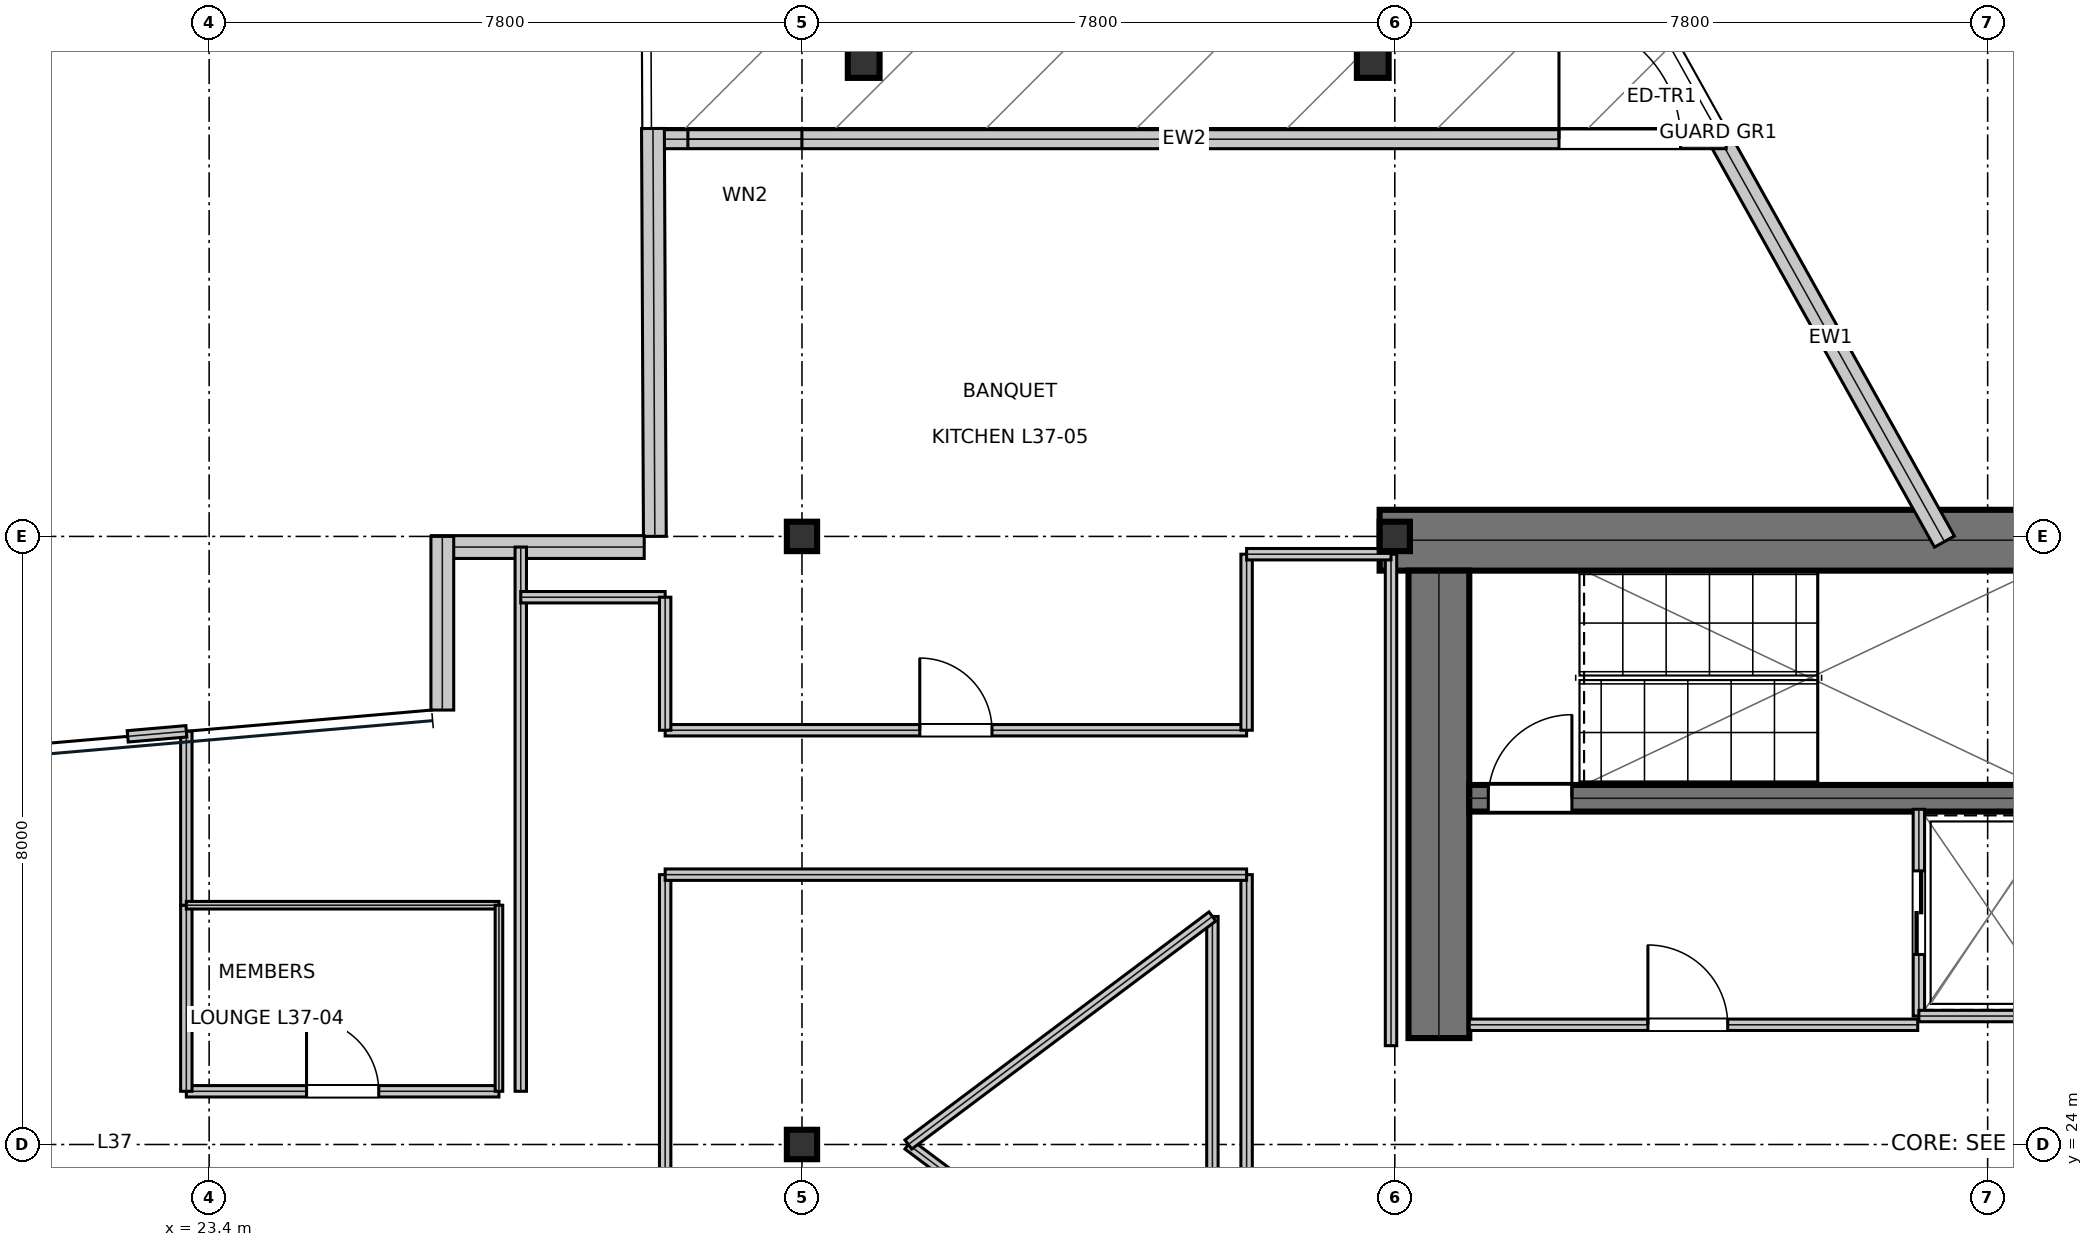
"""IFC4 building model, lengths in metres.
Left out: names, types, materials, properties, quantities, classifications, styles, units other than length and angle.
Written with IfcOpenShell. Run it as: python <this file> out.ifc"""

import sys

from ifc_helpers import new_model, si_unit, direction, frame, frame_2d, origin, origin_2d, place, context, subcontext, project, spatial, rectangle, i_section, extrude, element, fill, save


model = new_model("IFC4")
c1 = context("Model", 3, precision=1e-05, world=origin(), true_north=direction((0.0, 1.0)))
c2 = subcontext(c1, "Body", "Model", "MODEL_VIEW")
j1 = project(units=[si_unit("LENGTHUNIT", "METRE"), si_unit("PLANEANGLEUNIT", "RADIAN")], contexts=[c1])
p1 = place(None, origin())
s1 = spatial("IfcSite", under=j1, at=p1, CompositionType="ELEMENT")
p2 = place(p1, origin())
s2 = spatial("IfcBuilding", under=s1, at=p2, CompositionType="ELEMENT")
p3 = place(p2, frame((0.0, 0.0, 161.4)))
s3 = spatial("IfcBuildingStorey", under=s2, at=p3, CompositionType="ELEMENT", Elevation=161.4)
p4 = place(p3, frame((38.8, 31.95, 0.0), z_axis=(0.0, 0.0, 1.0), x_axis=(1.0, 0.0, 0.0)))
e1 = element("IfcWall", 1, at=p4, inside=s3, PredefinedType="SHEAR", context=c2, shape_type="SweptSolid", body=[
    extrude(rectangle(XDim=16.0, YDim=0.8, at=frame_2d((8.0, 0.0))), origin(), (0.0, 0.0, 1.0), 3.81),
])
p5 = place(p3, frame((39.58, 25.4, 0.0), z_axis=(0.0, 0.0, 1.0), x_axis=(0.0, 1.0, 0.0)))
e2 = element("IfcWall", 2, at=p5, inside=s3, PredefinedType="SHEAR", context=c2, shape_type="SweptSolid", body=[
    extrude(rectangle(XDim=6.15, YDim=0.8, at=frame_2d((3.075, 0.0))), origin(), (0.0, 0.0, 1.0), 3.81),
])
p6 = place(p3, frame((39.98, 28.555, 0.0), z_axis=(0.0, 0.0, 1.0), x_axis=(1.0, 0.0, 0.0)))
e3 = element("IfcWall", 3, at=p6, inside=s3, PredefinedType="SHEAR", context=c2, shape_type="SweptSolid", body=[
    extrude(rectangle(XDim=7.71, YDim=0.35, at=frame_2d((3.855, 0.0))), origin(), (0.0, 0.0, 1.0), 3.81),
])
p7 = place(p6, frame((0.25, 0.0, 0.0)))
e4 = element("IfcOpeningElement", 4, at=p7, cuts=e3, PredefinedType="OPENING", context=c2, shape_type="SweptSolid", body=[
    extrude(rectangle(XDim=1.1, YDim=2.15, at=frame_2d((0.55, 1.075))), frame((0.0, 0.185, 0.0), z_axis=(0.0, -1.0, 0.0), x_axis=(1.0, 0.0, 0.0)), (0.0, 0.0, 1.0), 0.37),
])
for number, where, z_axis, x_axis in (
    (5, (31.2, 24.0, 0.0), (0.0, 0.0, 1.0), (1.0, 0.0, 0.0)),
    (6, (31.2, 32.0, 0.0), (0.0, 0.0, 1.0), (1.0, 0.0, 0.0)),
    (7, (39.0, 32.0, 0.0), (0.0, 0.0, 1.0), (1.0, 0.0, 0.0)),
):
    element("IfcColumn", number, at=place(p3, frame(where, z_axis=z_axis, x_axis=x_axis)), inside=s3, PredefinedType="COLUMN", context=c2, shape_type="SweptSolid", body=[
        extrude(i_section(OverallWidth=0.398, OverallDepth=0.387, WebThickness=0.021, FlangeThickness=0.033, at=origin_2d()), origin(), (0.0, 0.0, 1.0), 4.044),
    ])
p8 = place(p3, frame((32.012, 38.26, 0.016), z_axis=(0.003463243796, -0.00747331556, 0.999966077173), x_axis=(0.907310606534, 0.420461012784, 0.0)))
e8 = element("IfcColumn", 8, at=p8, inside=s3, PredefinedType="COLUMN", context=c2, shape_type="SweptSolid", body=[
    extrude(i_section(OverallWidth=0.418, OverallDepth=0.455, WebThickness=0.042, FlangeThickness=0.068, at=origin_2d()), origin(), (0.0, 0.0, 1.0), 4.018),
])
p9 = place(p3, frame((38.71, 38.26, 0.016), z_axis=(-0.001215179652, -0.007473354861, 0.999971335742), x_axis=(0.987036848987, -0.160493796583, 0.0)))
e9 = element("IfcColumn", 9, at=p9, inside=s3, PredefinedType="COLUMN", context=c2, shape_type="SweptSolid", body=[
    extrude(i_section(OverallWidth=0.418, OverallDepth=0.455, WebThickness=0.042, FlangeThickness=0.068, at=origin_2d()), origin(), (0.0, 0.0, 1.0), 4.018),
])
p10 = place(p3, frame((46.231, 31.932, 0.0), z_axis=(0.0, 0.0, 1.0), x_axis=(-0.487234407079, 0.873271225083, 0.0)))
e10 = element("IfcWall", 10, at=p10, inside=s3, PredefinedType="STANDARD", context=c2, shape_type="SweptSolid", body=[
    extrude(rectangle(XDim=6.145, YDim=0.3, at=frame_2d((3.072, 0.0))), origin(), (0.0, 0.0, 1.0), 3.338),
])
p11 = place(p3, frame((43.36, 37.226, 0.0), z_axis=(0.0, 0.0, 1.0), x_axis=(-1.0, 0.0, 0.0)))
e11 = element("IfcWall", 11, at=p11, inside=s3, PredefinedType="STANDARD", context=c2, shape_type="SweptSolid", body=[
    extrude(rectangle(XDim=14.26, YDim=0.25, at=frame_2d((7.13, 0.0))), origin(), (0.0, 0.0, 1.0), 3.19),
])
p12 = place(p11, frame((0.6, 0.0, 0.0)))
e12 = element("IfcOpeningElement", 12, at=p12, cuts=e11, PredefinedType="OPENING", context=c2, shape_type="SweptSolid", body=[
    extrude(rectangle(XDim=1.6, YDim=2.2, at=frame_2d((0.8, 1.1))), frame((0.0, 0.135, 0.0), z_axis=(0.0, -1.0, 0.0), x_axis=(1.0, 0.0, 0.0)), (0.0, 0.0, 1.0), 0.27),
])
p13 = place(p11, frame((12.161, 0.0, 0.95)))
e13 = element("IfcOpeningElement", 13, at=p13, cuts=e11, PredefinedType="OPENING", context=c2, shape_type="SweptSolid", body=[
    extrude(rectangle(XDim=1.5, YDim=1.6, at=frame_2d((0.75, 0.8))), frame((0.0, 0.135, 0.0), z_axis=(0.0, -1.0, 0.0), x_axis=(1.0, 0.0, 0.0)), (0.0, 0.0, 1.0), 0.27),
])
p14 = place(p3, frame((29.239, 37.367, 0.0), z_axis=(0.0, 0.0, 1.0), x_axis=(0.004686240002, -0.999989019517, 0.0)))
e14 = element("IfcWall", 14, at=p14, inside=s3, PredefinedType="STANDARD", context=c2, shape_type="SweptSolid", body=[
    extrude(rectangle(XDim=5.366, YDim=0.3, at=frame_2d((2.683, 0.0))), origin(), (0.0, 0.0, 1.0), 3.81),
])
p15 = place(p3, frame((29.124, 31.86, 0.0), z_axis=(0.0, 0.0, 1.0), x_axis=(-1.0, 0.0, 0.0)))
e15 = element("IfcWall", 15, at=p15, inside=s3, PredefinedType="STANDARD", context=c2, shape_type="SweptSolid", body=[
    extrude(rectangle(XDim=2.796, YDim=0.3, at=frame_2d((1.398, 0.0))), origin(), (0.0, 0.0, 1.0), 3.81),
])
p16 = place(p3, frame((26.468, 32.0, 0.0), z_axis=(0.0, 0.0, 1.0), x_axis=(0.0, -1.0, 0.0)))
e16 = element("IfcWall", 16, at=p16, inside=s3, PredefinedType="STANDARD", context=c2, shape_type="SweptSolid", body=[
    extrude(rectangle(XDim=2.284, YDim=0.3, at=frame_2d((1.142, 0.0))), origin(), (0.0, 0.0, 1.0), 3.338),
])
p17 = place(p3, frame((39.98, 25.575, 0.0), z_axis=(0.0, 0.0, 1.0), x_axis=(1.0, 0.0, 0.0)))
e17 = element("IfcWall", 17, at=p17, inside=s3, PredefinedType="PARTITIONING", context=c2, shape_type="SweptSolid", body=[
    extrude(rectangle(XDim=5.9, YDim=0.15, at=frame_2d((2.95, 0.0))), origin(), (0.0, 0.0, 1.0), 3.81),
])
p18 = place(p17, frame((2.35, 0.0, 0.0)))
e18 = element("IfcOpeningElement", 18, at=p18, cuts=e17, PredefinedType="OPENING", context=c2, shape_type="SweptSolid", body=[
    extrude(rectangle(XDim=1.05, YDim=2.15, at=frame_2d((0.525, 1.075))), frame((0.0, 0.085, 0.0), z_axis=(0.0, -1.0, 0.0), x_axis=(1.0, 0.0, 0.0)), (0.0, 0.0, 1.0), 0.17),
])
p19 = place(p3, frame((45.895, 25.69, 0.0), z_axis=(0.0, 0.0, 1.0), x_axis=(0.0, 1.0, 0.0)))
e19 = element("IfcWall", 19, at=p19, inside=s3, PredefinedType="PARTITIONING", context=c2, shape_type="SweptSolid", body=[
    extrude(rectangle(XDim=2.72, YDim=0.15, at=frame_2d((1.36, 0.0))), origin(), (0.0, 0.0, 1.0), 3.81),
])
p20 = place(p19, frame((0.81, 0.0, 0.0)))
e20 = element("IfcOpeningElement", 20, at=p20, cuts=e19, PredefinedType="OPENING", context=c2, shape_type="SweptSolid", body=[
    extrude(rectangle(XDim=1.1, YDim=2.15, at=frame_2d((0.55, 1.075))), frame((0.0, 0.085, 0.0), z_axis=(0.0, -1.0, 0.0), x_axis=(1.0, 0.0, 0.0)), (0.0, 0.0, 1.0), 0.17),
])
p21 = place(p3, frame((45.895, 25.69, 0.0), z_axis=(0.0, 0.0, 1.0), x_axis=(1.0, 0.0, 0.0)))
e21 = element("IfcWall", 21, at=p21, inside=s3, PredefinedType="PARTITIONING", context=c2, shape_type="SweptSolid", body=[
    extrude(rectangle(XDim=1.915, YDim=0.15, at=frame_2d((0.958, 0.0))), origin(), (0.0, 0.0, 1.0), 3.81),
])
p22 = place(p3, frame((37.05, 14.5, 0.0), z_axis=(0.0, 0.0, 1.0), x_axis=(0.0, 1.0, 0.0)))
e22 = element("IfcWall", 22, at=p22, inside=s3, PredefinedType="PARTITIONING", context=c2, shape_type="SweptSolid", body=[
    extrude(rectangle(XDim=13.05, YDim=0.15, at=frame_2d((6.525, 0.0))), origin(), (0.0, 0.0, 1.0), 3.19),
])
p23 = place(p22, frame((4.61, 0.0, 0.0)))
e23 = element("IfcOpeningElement", 23, at=p23, cuts=e22, PredefinedType="OPENING", context=c2, shape_type="SweptSolid", body=[
    extrude(rectangle(XDim=0.95, YDim=2.15, at=frame_2d((0.475, 1.075))), frame((0.0, 0.085, 0.0), z_axis=(0.0, -1.0, 0.0), x_axis=(1.0, 0.0, 0.0)), (0.0, 0.0, 1.0), 0.17),
])
p24 = place(p3, frame((23.1, 24.7, 0.0), z_axis=(0.0, 0.0, 1.0), x_axis=(1.0, 0.0, 0.0)))
e24 = element("IfcWall", 24, at=p24, inside=s3, PredefinedType="PARTITIONING", context=c2, shape_type="SweptSolid", body=[
    extrude(rectangle(XDim=4.113, YDim=0.15, at=frame_2d((2.056, 0.0))), origin(), (0.0, 0.0, 1.0), 3.19),
])
p25 = place(p24, frame((1.582, 0.0, 0.0)))
e25 = element("IfcOpeningElement", 25, at=p25, cuts=e24, PredefinedType="OPENING", context=c2, shape_type="SweptSolid", body=[
    extrude(rectangle(XDim=0.95, YDim=2.15, at=frame_2d((0.475, 1.075))), frame((0.0, 0.085, 0.0), z_axis=(0.0, -1.0, 0.0), x_axis=(1.0, 0.0, 0.0)), (0.0, 0.0, 1.0), 0.17),
])
p26 = place(p3, frame((29.4, 29.45, 0.0), z_axis=(0.0, 0.0, 1.0), x_axis=(1.0, 0.0, 0.0)))
e26 = element("IfcWall", 26, at=p26, inside=s3, PredefinedType="PARTITIONING", context=c2, shape_type="SweptSolid", body=[
    extrude(rectangle(XDim=7.65, YDim=0.15, at=frame_2d((3.825, 0.0))), origin(), (0.0, 0.0, 1.0), 3.19),
])
p27 = place(p26, frame((3.35, 0.0, 0.0)))
e27 = element("IfcOpeningElement", 27, at=p27, cuts=e26, PredefinedType="OPENING", context=c2, shape_type="SweptSolid", body=[
    extrude(rectangle(XDim=0.95, YDim=2.15, at=frame_2d((0.475, 1.075))), frame((0.0, 0.085, 0.0), z_axis=(0.0, -1.0, 0.0), x_axis=(1.0, 0.0, 0.0)), (0.0, 0.0, 1.0), 0.17),
])
p28 = place(p3, frame((29.4, 16.8, 0.0), z_axis=(0.0, 0.0, 1.0), x_axis=(0.0, 1.0, 0.0)))
e28 = element("IfcWall", 28, at=p28, inside=s3, PredefinedType="PARTITIONING", context=c2, shape_type="SweptSolid", body=[
    extrude(rectangle(XDim=10.75, YDim=0.15, at=frame_2d((5.375, 0.0))), origin(), (0.0, 0.0, 1.0), 3.19),
])
p29 = place(p3, frame((29.4, 27.55, 0.0), z_axis=(0.0, 0.0, 1.0), x_axis=(1.0, 0.0, 0.0)))
e29 = element("IfcWall", 29, at=p29, inside=s3, PredefinedType="PARTITIONING", context=c2, shape_type="SweptSolid", body=[
    extrude(rectangle(XDim=7.65, YDim=0.15, at=frame_2d((3.825, 0.0))), origin(), (0.0, 0.0, 1.0), 3.19),
])
p30 = place(p3, frame((23.1, 24.7, 0.0), z_axis=(0.0, 0.0, 1.0), x_axis=(0.0, 1.0, 0.0)))
e30 = element("IfcWall", 30, at=p30, inside=s3, PredefinedType="PARTITIONING", context=c2, shape_type="SweptSolid", body=[
    extrude(rectangle(XDim=2.448, YDim=0.15, at=frame_2d((1.224, 0.0))), origin(), (0.0, 0.0, 1.0), 3.19),
])
p31 = place(p3, frame((27.5, 24.7, 0.0), z_axis=(0.0, 0.0, 1.0), x_axis=(0.0, 1.0, 0.0)))
e31 = element("IfcWall", 31, at=p31, inside=s3, PredefinedType="PARTITIONING", context=c2, shape_type="SweptSolid", body=[
    extrude(rectangle(XDim=7.16, YDim=0.15, at=frame_2d((3.58, 0.0))), origin(), (0.0, 0.0, 1.0), 3.338),
])
p32 = place(p3, frame((38.95, 25.3, 0.0), z_axis=(0.0, 0.0, 1.0), x_axis=(0.0, 1.0, 0.0)))
e32 = element("IfcWall", 32, at=p32, inside=s3, PredefinedType="PARTITIONING", context=c2, shape_type="SweptSolid", body=[
    extrude(rectangle(XDim=6.466, YDim=0.15, at=frame_2d((3.233, 0.0))), origin(), (0.0, 0.0, 1.0), 3.443),
])
p33 = place(p3, frame((37.05, 29.45, 0.0), z_axis=(0.0, 0.0, 1.0), x_axis=(0.0, 1.0, 0.0)))
e33 = element("IfcWall", 33, at=p33, inside=s3, PredefinedType="PARTITIONING", context=c2, shape_type="SweptSolid", body=[
    extrude(rectangle(XDim=2.316, YDim=0.15, at=frame_2d((1.158, 0.0))), origin(), (0.0, 0.0, 1.0), 3.443),
])
p34 = place(p3, frame((23.1, 27.148, 0.0), z_axis=(0.0, 0.0, 1.0), x_axis=(0.0, 1.0, 0.0)))
e34 = element("IfcWall", 34, at=p34, inside=s3, PredefinedType="PARTITIONING", context=c2, shape_type="SweptSolid", body=[
    extrude(rectangle(XDim=2.288, YDim=0.15, at=frame_2d((1.144, 0.0))), origin(), (0.0, 0.0, 1.0), 3.81),
])
p35 = place(p3, frame((37.05, 31.766, 0.0), z_axis=(0.0, 0.0, 1.0), x_axis=(1.0, 0.0, 0.0)))
e35 = element("IfcWall", 35, at=p35, inside=s3, PredefinedType="PARTITIONING", context=c2, shape_type="SweptSolid", body=[
    extrude(rectangle(XDim=1.9, YDim=0.15, at=frame_2d((0.95, 0.0))), origin(), (0.0, 0.0, 1.0), 3.19),
])
p36 = place(p3, frame((27.5, 31.2, 0.0), z_axis=(0.0, 0.0, 1.0), x_axis=(1.0, 0.0, 0.0)))
e36 = element("IfcWall", 36, at=p36, inside=s3, PredefinedType="PARTITIONING", context=c2, shape_type="SweptSolid", body=[
    extrude(rectangle(XDim=1.9, YDim=0.15, at=frame_2d((0.95, 0.0))), origin(), (0.0, 0.0, 1.0), 3.338),
])
p37 = place(p3, frame((29.4, 29.45, 0.0), z_axis=(0.0, 0.0, 1.0), x_axis=(0.0, 1.0, 0.0)))
e37 = element("IfcWall", 37, at=p37, inside=s3, PredefinedType="PARTITIONING", context=c2, shape_type="SweptSolid", body=[
    extrude(rectangle(XDim=1.75, YDim=0.15, at=frame_2d((0.875, 0.0))), origin(), (0.0, 0.0, 1.0), 3.81),
])
p38 = place(p3, frame((22.328, 29.369, 0.0), z_axis=(0.0, 0.0, 1.0), x_axis=(0.996264203876, 0.086357605777, 0.0)))
e38 = element("IfcWall", 38, at=p38, inside=s3, PredefinedType="PARTITIONING", context=c2, shape_type="SweptSolid", body=[
    extrude(rectangle(XDim=0.775, YDim=0.15, at=frame_2d((0.387, 0.0))), origin(), (0.0, 0.0, 1.0), 3.81),
])
p39 = place(p3, frame((23.1, 27.148, 0.0), z_axis=(0.0, 0.0, 1.0), x_axis=(1.0, 0.0, 0.0)))
e39 = element("IfcWall", 39, at=p39, inside=s3, PredefinedType="PARTITIONING", context=c2, shape_type="SweptSolid", body=[
    extrude(rectangle(XDim=4.113, YDim=0.1, at=frame_2d((2.056, 0.0))), origin(), (0.0, 0.0, 1.0), 3.81),
])
p40 = place(p3, frame((27.213, 24.7, 0.0), z_axis=(0.0, 0.0, 1.0), x_axis=(0.0, 1.0, 0.0)))
e40 = element("IfcWall", 40, at=p40, inside=s3, PredefinedType="PARTITIONING", context=c2, shape_type="SweptSolid", body=[
    extrude(rectangle(XDim=2.448, YDim=0.1, at=frame_2d((1.224, 0.0))), origin(), (0.0, 0.0, 1.0), 3.81),
])
p41 = place(p3, frame((32.6, 24.0, 0.0), z_axis=(0.0, 0.0, 1.0), x_axis=(0.8, -0.6, 0.0)))
e41 = element("IfcWall", 41, at=p41, inside=s3, PredefinedType="MOVABLE", context=c2, shape_type="SweptSolid", body=[
    extrude(rectangle(XDim=5.0, YDim=0.15, at=frame_2d((2.5, 0.0))), origin(), (0.0, 0.0, 1.0), 3.81),
])
p42 = place(p3, frame((36.6, 21.0, 0.0), z_axis=(0.0, 0.0, 1.0), x_axis=(0.0, 1.0, 0.0)))
e42 = element("IfcWall", 42, at=p42, inside=s3, PredefinedType="MOVABLE", context=c2, shape_type="SweptSolid", body=[
    extrude(rectangle(XDim=6.0, YDim=0.15, at=frame_2d((3.0, 0.0))), origin(), (0.0, 0.0, 1.0), 3.81),
])
p43 = place(p3, frame((36.6, 27.0, 0.0), z_axis=(0.0, 0.0, 1.0), x_axis=(-0.8, -0.6, 0.0)))
e43 = element("IfcWall", 43, at=p43, inside=s3, PredefinedType="MOVABLE", context=c2, shape_type="SweptSolid", body=[
    extrude(rectangle(XDim=5.0, YDim=0.15, at=frame_2d((2.5, 0.0))), origin(), (0.0, 0.0, 1.0), 3.81),
])
p44 = place(p12, frame((1.6, 0.0, 0.0), z_axis=(0.0, 0.0, 1.0), x_axis=(-1.0, 0.0, 0.0)))
e44 = element("IfcDoor", 44, at=p44, inside=s3, OperationType="SINGLE_SWING_LEFT", PredefinedType="DOOR", context=c2, shape_type="SweptSolid", body=[
    extrude(rectangle(XDim=1.6, YDim=2.2, at=frame_2d((0.8, 1.1))), frame((0.0, 0.025, 0.0), z_axis=(0.0, -1.0, 0.0), x_axis=(1.0, 0.0, 0.0)), (0.0, 0.0, 1.0), 0.05),
])
fill(e12, e44)
p45 = place(p13, origin())
e45 = element("IfcWindow", 45, at=p45, inside=s3, PartitioningType="SINGLE_PANEL", PredefinedType="WINDOW", context=c2, shape_type="SweptSolid", body=[
    extrude(rectangle(XDim=1.5, YDim=1.6, at=frame_2d((0.75, 0.8))), frame((0.0, 0.03, 0.0), z_axis=(0.0, -1.0, 0.0), x_axis=(1.0, 0.0, 0.0)), (0.0, 0.0, 1.0), 0.06),
])
fill(e13, e45)
p46 = place(p18, origin())
e46 = element("IfcDoor", 46, at=p46, inside=s3, OperationType="SINGLE_SWING_LEFT", PredefinedType="DOOR", context=c2, shape_type="SweptSolid", body=[
    extrude(rectangle(XDim=1.05, YDim=2.15, at=frame_2d((0.525, 1.075))), frame((0.0, 0.025, 0.0), z_axis=(0.0, -1.0, 0.0), x_axis=(1.0, 0.0, 0.0)), (0.0, 0.0, 1.0), 0.05),
])
fill(e18, e46)
p47 = place(p20, frame((1.1, 0.0, 0.0), z_axis=(0.0, 0.0, 1.0), x_axis=(-1.0, 0.0, 0.0)))
e47 = element("IfcDoor", 47, at=p47, inside=s3, OperationType="DOUBLE_DOOR_SLIDING", PredefinedType="DOOR", context=c2, shape_type="SweptSolid", body=[
    extrude(rectangle(XDim=1.1, YDim=2.15, at=frame_2d((0.55, 1.075))), frame((0.0, 0.025, 0.0), z_axis=(0.0, -1.0, 0.0), x_axis=(1.0, 0.0, 0.0)), (0.0, 0.0, 1.0), 0.05),
])
fill(e20, e47)
p48 = place(p25, origin())
e48 = element("IfcDoor", 48, at=p48, inside=s3, OperationType="SINGLE_SWING_LEFT", PredefinedType="DOOR", context=c2, shape_type="SweptSolid", body=[
    extrude(rectangle(XDim=0.95, YDim=2.15, at=frame_2d((0.475, 1.075))), frame((0.0, 0.025, 0.0), z_axis=(0.0, -1.0, 0.0), x_axis=(1.0, 0.0, 0.0)), (0.0, 0.0, 1.0), 0.05),
])
fill(e25, e48)
p49 = place(p27, origin())
e49 = element("IfcDoor", 49, at=p49, inside=s3, OperationType="SINGLE_SWING_LEFT", PredefinedType="DOOR", context=c2, shape_type="SweptSolid", body=[
    extrude(rectangle(XDim=0.95, YDim=2.15, at=frame_2d((0.475, 1.075))), frame((0.0, 0.025, 0.0), z_axis=(0.0, -1.0, 0.0), x_axis=(1.0, 0.0, 0.0)), (0.0, 0.0, 1.0), 0.05),
])
fill(e27, e49)
p50 = place(p7, origin())
e50 = element("IfcDoor", 50, at=p50, inside=s3, OperationType="SINGLE_SWING_RIGHT", PredefinedType="DOOR", context=c2, shape_type="SweptSolid", body=[
    extrude(rectangle(XDim=1.1, YDim=2.15, at=frame_2d((0.55, 1.075))), frame((0.0, 0.025, 0.0), z_axis=(0.0, -1.0, 0.0), x_axis=(1.0, 0.0, 0.0)), (0.0, 0.0, 1.0), 0.05),
])
fill(e4, e50)
save(model, sys.argv[1])
